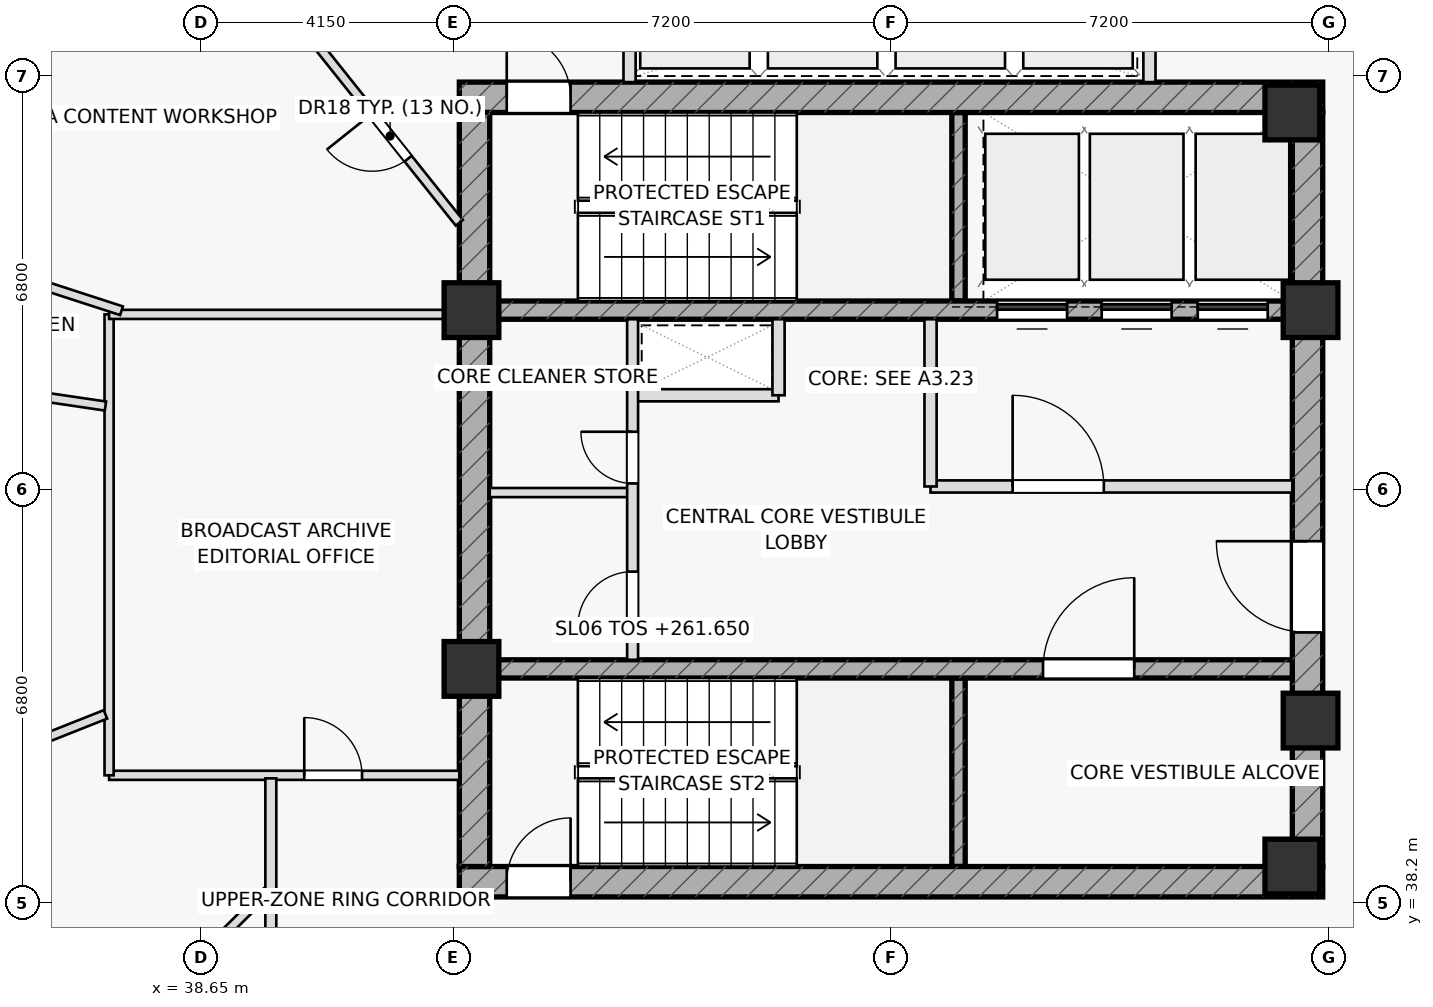
"""IFC4 building model, lengths in metres.
Left out: names, types, materials, properties, quantities, classifications, styles, units other than length and angle.
Written with IfcOpenShell. Run it as: python <this file> out.ifc"""

import sys

from ifc_helpers import new_model, si_unit, direction, frame, frame_2d, origin, origin_2d, place, context, subcontext, project, spatial, rectangle, extrude, element, fill, save


model = new_model("IFC4")
c1 = context("Model", 3, precision=1e-05, world=origin(), true_north=direction((0.0, 1.0)))
c2 = subcontext(c1, "Body", "Model", "MODEL_VIEW")
j1 = project(units=[si_unit("LENGTHUNIT", "METRE"), si_unit("PLANEANGLEUNIT", "RADIAN")], contexts=[c1])
p1 = place(None, origin())
s1 = spatial("IfcSite", under=j1, at=p1, CompositionType="ELEMENT")
p2 = place(p1, origin())
s2 = spatial("IfcBuilding", under=s1, at=p2, CompositionType="ELEMENT")
p3 = place(p2, frame((0.0, 0.0, 261.65)))
s3 = spatial("IfcBuildingStorey", under=s2, at=p3, CompositionType="ELEMENT", Elevation=261.65)
for number, where, z_axis, x_axis in (
    (1, (51.11, 48.1, 0.0), (0.0, 0.0, 1.0), (0.0, 1.0, 0.0)),
    (2, (51.11, 38.8, 0.0), (0.0, 0.0, 1.0), (0.0, 1.0, 0.0)),
):
    element("IfcWall", number, at=place(p3, frame(where, z_axis=z_axis, x_axis=x_axis)), inside=s3, PredefinedType="SHEAR", context=c2, shape_type="SweptSolid", body=[
        extrude(rectangle(XDim=3.1, YDim=0.22, at=frame_2d((1.55, 0.0))), origin(), (0.0, 0.0, 1.0), 3.65),
    ])
p4 = place(p3, frame((42.9, 51.45, 0.0), z_axis=(0.0, 0.0, 1.0), x_axis=(1.0, 0.0, 0.0)))
e3 = element("IfcWall", 3, at=p4, inside=s3, PredefinedType="SHEAR", context=c2, shape_type="SweptSolid", body=[
    extrude(rectangle(XDim=14.2, YDim=0.5, at=frame_2d((7.1, 0.0))), origin(), (0.0, 0.0, 1.0), 3.65),
])
p5 = place(p4, frame((0.78, 0.0, 0.0)))
e4 = element("IfcOpeningElement", 4, at=p5, cuts=e3, PredefinedType="OPENING", context=c2, shape_type="SweptSolid", body=[
    extrude(rectangle(XDim=1.05, YDim=2.2, at=frame_2d((0.525, 1.1))), frame((0.0, 0.26, 0.0), z_axis=(0.0, -1.0, 0.0), x_axis=(1.0, 0.0, 0.0)), (0.0, 0.0, 1.0), 0.52),
])
p6 = place(p3, frame((42.9, 38.55, 0.0), z_axis=(0.0, 0.0, 1.0), x_axis=(1.0, 0.0, 0.0)))
e5 = element("IfcWall", 5, at=p6, inside=s3, PredefinedType="SHEAR", context=c2, shape_type="SweptSolid", body=[
    extrude(rectangle(XDim=14.2, YDim=0.5, at=frame_2d((7.1, 0.0))), origin(), (0.0, 0.0, 1.0), 3.65),
])
p7 = place(p6, frame((0.78, 0.0, 0.0)))
e6 = element("IfcOpeningElement", 6, at=p7, cuts=e5, PredefinedType="OPENING", context=c2, shape_type="SweptSolid", body=[
    extrude(rectangle(XDim=1.05, YDim=2.2, at=frame_2d((0.525, 1.1))), frame((0.0, 0.26, 0.0), z_axis=(0.0, -1.0, 0.0), x_axis=(1.0, 0.0, 0.0)), (0.0, 0.0, 1.0), 0.52),
])
p8 = place(p3, frame((43.15, 38.8, 0.0), z_axis=(0.0, 0.0, 1.0), x_axis=(0.0, 1.0, 0.0)))
e7 = element("IfcWall", 7, at=p8, inside=s3, PredefinedType="SHEAR", context=c2, shape_type="SweptSolid", body=[
    extrude(rectangle(XDim=12.4, YDim=0.5, at=frame_2d((6.2, 0.0))), origin(), (0.0, 0.0, 1.0), 3.65),
])
p9 = place(p3, frame((56.85, 38.8, 0.0), z_axis=(0.0, 0.0, 1.0), x_axis=(0.0, 1.0, 0.0)))
e8 = element("IfcWall", 8, at=p9, inside=s3, PredefinedType="SHEAR", context=c2, shape_type="SweptSolid", body=[
    extrude(rectangle(XDim=12.4, YDim=0.5, at=frame_2d((6.2, 0.0))), origin(), (0.0, 0.0, 1.0), 3.65),
])
p10 = place(p9, frame((3.85, 0.0, 0.0)))
e9 = element("IfcOpeningElement", 9, at=p10, cuts=e8, PredefinedType="OPENING", context=c2, shape_type="SweptSolid", body=[
    extrude(rectangle(XDim=1.5, YDim=2.2, at=frame_2d((0.75, 1.1))), frame((0.0, 0.26, 0.0), z_axis=(0.0, -1.0, 0.0), x_axis=(1.0, 0.0, 0.0)), (0.0, 0.0, 1.0), 0.52),
])
p11 = place(p3, frame((43.4, 47.95, 0.0), z_axis=(0.0, 0.0, 1.0), x_axis=(1.0, 0.0, 0.0)))
e10 = element("IfcWall", 10, at=p11, inside=s3, PredefinedType="SHEAR", context=c2, shape_type="SweptSolid", body=[
    extrude(rectangle(XDim=13.2, YDim=0.3, at=frame_2d((6.6, 0.0))), origin(), (0.0, 0.0, 1.0), 3.65),
])
p12 = place(p11, frame((8.345, 0.0, 0.0)))
e11 = element("IfcOpeningElement", 11, at=p12, cuts=e10, PredefinedType="OPENING", context=c2, shape_type="SweptSolid", body=[
    extrude(rectangle(XDim=1.15, YDim=2.2, at=frame_2d((0.575, 1.1))), frame((0.0, 0.16, 0.0), z_axis=(0.0, -1.0, 0.0), x_axis=(1.0, 0.0, 0.0)), (0.0, 0.0, 1.0), 0.32),
])
p13 = place(p11, frame((10.065, 0.0, 0.0)))
e12 = element("IfcOpeningElement", 12, at=p13, cuts=e10, PredefinedType="OPENING", context=c2, shape_type="SweptSolid", body=[
    extrude(rectangle(XDim=1.15, YDim=2.2, at=frame_2d((0.575, 1.1))), frame((0.0, 0.16, 0.0), z_axis=(0.0, -1.0, 0.0), x_axis=(1.0, 0.0, 0.0)), (0.0, 0.0, 1.0), 0.32),
])
p14 = place(p11, frame((11.645, 0.0, 0.0)))
e13 = element("IfcOpeningElement", 13, at=p14, cuts=e10, PredefinedType="OPENING", context=c2, shape_type="SweptSolid", body=[
    extrude(rectangle(XDim=1.15, YDim=2.2, at=frame_2d((0.575, 1.1))), frame((0.0, 0.16, 0.0), z_axis=(0.0, -1.0, 0.0), x_axis=(1.0, 0.0, 0.0)), (0.0, 0.0, 1.0), 0.32),
])
p15 = place(p3, frame((43.4, 42.05, 0.0), z_axis=(0.0, 0.0, 1.0), x_axis=(1.0, 0.0, 0.0)))
e14 = element("IfcWall", 14, at=p15, inside=s3, PredefinedType="SHEAR", context=c2, shape_type="SweptSolid", body=[
    extrude(rectangle(XDim=13.2, YDim=0.3, at=frame_2d((6.6, 0.0))), origin(), (0.0, 0.0, 1.0), 3.65),
])
p16 = place(p15, frame((9.1, 0.0, 0.0)))
e15 = element("IfcOpeningElement", 15, at=p16, cuts=e14, PredefinedType="OPENING", context=c2, shape_type="SweptSolid", body=[
    extrude(rectangle(XDim=1.5, YDim=2.2, at=frame_2d((0.75, 1.1))), frame((0.0, 0.16, 0.0), z_axis=(0.0, -1.0, 0.0), x_axis=(1.0, 0.0, 0.0)), (0.0, 0.0, 1.0), 0.32),
])
for number, where, z_axis, x_axis in (
    (16, (43.1, 47.95, 0.0), (0.0, 0.0, 1.0), (1.0, 0.0, 0.0)),
    (17, (56.9, 47.95, 0.0), (0.0, 0.0, 1.0), (1.0, 0.0, 0.0)),
    (18, (56.6, 51.2, 0.0), (0.0, 0.0, 1.0), (1.0, 0.0, 0.0)),
    (19, (43.1, 42.05, 0.0), (0.0, 0.0, 1.0), (1.0, 0.0, 0.0)),
    (20, (56.9, 41.2, 0.0), (0.0, 0.0, 1.0), (1.0, 0.0, 0.0)),
    (21, (56.6, 38.8, 0.0), (0.0, 0.0, 1.0), (1.0, 0.0, 0.0)),
):
    element("IfcColumn", number, at=place(p3, frame(where, z_axis=z_axis, x_axis=x_axis)), inside=s3, PredefinedType="COLUMN", context=c2, shape_type="SweptSolid", body=[
        extrude(rectangle(XDim=0.9, YDim=0.9, at=origin_2d()), origin(), (0.0, 0.0, 1.0), 3.65),
    ])
for number, where, z_axis, x_axis in (
    (22, (45.7, 51.7, 0.0), (0.0, 0.0, 1.0), (0.0, 1.0, 0.0)),
    (23, (54.25, 51.7, 0.0), (0.0, 0.0, 1.0), (0.0, 1.0, 0.0)),
):
    element("IfcWall", number, at=place(p3, frame(where, z_axis=z_axis, x_axis=x_axis)), inside=s3, PredefinedType="PARTITIONING", context=c2, shape_type="SweptSolid", body=[
        extrude(rectangle(XDim=2.6, YDim=0.2, at=frame_2d((1.3, 0.0))), origin(), (0.0, 0.0, 1.0), 3.65),
    ])
p17 = place(p3, frame((45.75, 46.55, 0.0), z_axis=(0.0, 0.0, 1.0), x_axis=(1.0, 0.0, 0.0)))
e24 = element("IfcWall", 24, at=p17, inside=s3, PredefinedType="PARTITIONING", context=c2, shape_type="SweptSolid", body=[
    extrude(rectangle(XDim=2.4, YDim=0.2, at=frame_2d((1.2, 0.0))), origin(), (0.0, 0.0, 1.0), 3.65),
])
p18 = place(p3, frame((48.15, 46.55, 0.0), z_axis=(0.0, 0.0, 1.0), x_axis=(0.0, 1.0, 0.0)))
e25 = element("IfcWall", 25, at=p18, inside=s3, PredefinedType="PARTITIONING", context=c2, shape_type="SweptSolid", body=[
    extrude(rectangle(XDim=1.25, YDim=0.2, at=frame_2d((0.625, 0.0))), origin(), (0.0, 0.0, 1.0), 3.65),
])
p19 = place(p3, frame((50.65, 45.05, 0.0), z_axis=(0.0, 0.0, 1.0), x_axis=(1.0, 0.0, 0.0)))
e26 = element("IfcWall", 26, at=p19, inside=s3, PredefinedType="PARTITIONING", context=c2, shape_type="SweptSolid", body=[
    extrude(rectangle(XDim=5.95, YDim=0.2, at=frame_2d((2.975, 0.0))), origin(), (0.0, 0.0, 1.0), 3.65),
])
p20 = place(p19, frame((1.35, 0.0, 0.0)))
e27 = element("IfcOpeningElement", 27, at=p20, cuts=e26, PredefinedType="OPENING", context=c2, shape_type="SweptSolid", body=[
    extrude(rectangle(XDim=1.5, YDim=2.2, at=frame_2d((0.75, 1.1))), frame((0.0, 0.11, 0.0), z_axis=(0.0, -1.0, 0.0), x_axis=(1.0, 0.0, 0.0)), (0.0, 0.0, 1.0), 0.22),
])
p21 = place(p3, frame((50.65, 45.05, 0.0), z_axis=(0.0, 0.0, 1.0), x_axis=(0.0, 1.0, 0.0)))
e28 = element("IfcWall", 28, at=p21, inside=s3, PredefinedType="PARTITIONING", context=c2, shape_type="SweptSolid", body=[
    extrude(rectangle(XDim=2.75, YDim=0.2, at=frame_2d((1.375, 0.0))), origin(), (0.0, 0.0, 1.0), 3.65),
])
p22 = place(p3, frame((43.4, 44.95, 0.0), z_axis=(0.0, 0.0, 1.0), x_axis=(1.0, 0.0, 0.0)))
e29 = element("IfcWall", 29, at=p22, inside=s3, PredefinedType="PARTITIONING", context=c2, shape_type="SweptSolid", body=[
    extrude(rectangle(XDim=2.35, YDim=0.15, at=frame_2d((1.175, 0.0))), origin(), (0.0, 0.0, 1.0), 3.65),
])
p23 = place(p3, frame((45.75, 42.2, 0.0), z_axis=(0.0, 0.0, 1.0), x_axis=(0.0, 1.0, 0.0)))
e30 = element("IfcWall", 30, at=p23, inside=s3, PredefinedType="PARTITIONING", context=c2, shape_type="SweptSolid", body=[
    extrude(rectangle(XDim=5.6, YDim=0.18, at=frame_2d((2.8, 0.0))), origin(), (0.0, 0.0, 1.0), 3.65),
])
p24 = place(p23, frame((0.55, 0.0, 0.0)))
e31 = element("IfcOpeningElement", 31, at=p24, cuts=e30, PredefinedType="OPENING", context=c2, shape_type="SweptSolid", body=[
    extrude(rectangle(XDim=0.9, YDim=2.05, at=frame_2d((0.45, 1.025))), frame((0.0, 0.1, 0.0), z_axis=(0.0, -1.0, 0.0), x_axis=(1.0, 0.0, 0.0)), (0.0, 0.0, 1.0), 0.2),
])
p25 = place(p23, frame((2.9, 0.0, 0.0)))
e32 = element("IfcOpeningElement", 32, at=p25, cuts=e30, PredefinedType="OPENING", context=c2, shape_type="SweptSolid", body=[
    extrude(rectangle(XDim=0.85, YDim=2.05, at=frame_2d((0.425, 1.025))), frame((0.0, 0.1, 0.0), z_axis=(0.0, -1.0, 0.0), x_axis=(1.0, 0.0, 0.0)), (0.0, 0.0, 1.0), 0.2),
])
p26 = place(p3, frame((37.14, 40.3, 0.0), z_axis=(0.0, 0.0, 1.0), x_axis=(1.0, 0.0, 0.0)))
e33 = element("IfcWall", 33, at=p26, inside=s3, PredefinedType="PARTITIONING", context=c2, shape_type="SweptSolid", body=[
    extrude(rectangle(XDim=5.76, YDim=0.15, at=frame_2d((2.88, 0.0))), origin(), (0.0, 0.0, 1.0), 3.075),
])
p27 = place(p26, frame((3.21, 0.0, 0.0)))
e34 = element("IfcOpeningElement", 34, at=p27, cuts=e33, PredefinedType="OPENING", context=c2, shape_type="SweptSolid", body=[
    extrude(rectangle(XDim=0.95, YDim=2.05, at=frame_2d((0.475, 1.025))), frame((0.0, 0.085, 0.0), z_axis=(0.0, -1.0, 0.0), x_axis=(1.0, 0.0, 0.0)), (0.0, 0.0, 1.0), 0.17),
])
p28 = place(p3, frame((37.14, 40.3, 0.0), z_axis=(0.0, 0.0, 1.0), x_axis=(0.0, 1.0, 0.0)))
e35 = element("IfcWall", 35, at=p28, inside=s3, PredefinedType="PARTITIONING", context=c2, shape_type="SweptSolid", body=[
    extrude(rectangle(XDim=7.58, YDim=0.15, at=frame_2d((3.79, 0.0))), origin(), (0.0, 0.0, 1.0), 3.65),
])
p29 = place(p3, frame((37.14, 47.88, 0.0), z_axis=(0.0, 0.0, 1.0), x_axis=(1.0, 0.0, 0.0)))
e36 = element("IfcWall", 36, at=p29, inside=s3, PredefinedType="PARTITIONING", context=c2, shape_type="SweptSolid", body=[
    extrude(rectangle(XDim=5.76, YDim=0.15, at=frame_2d((2.88, 0.0))), origin(), (0.0, 0.0, 1.0), 3.075),
])
p30 = place(p3, frame((42.9, 49.386, 0.0), z_axis=(0.0, 0.0, 1.0), x_axis=(-0.623702774592, 0.781661594916, 0.0)))
e37 = element("IfcWall", 37, at=p30, inside=s3, PredefinedType="PARTITIONING", context=c2, shape_type="SweptSolid", body=[
    extrude(rectangle(XDim=18.162, YDim=0.15, at=frame_2d((9.081, 0.0))), origin(), (0.0, 0.0, 1.0), 3.075),
])
p31 = place(p30, frame((1.35, 0.0, 0.0)))
e38 = element("IfcOpeningElement", 38, at=p31, cuts=e37, PredefinedType="OPENING", context=c2, shape_type="SweptSolid", body=[
    extrude(rectangle(XDim=0.95, YDim=2.05, at=frame_2d((0.475, 1.025))), frame((0.0, 0.085, 0.0), z_axis=(0.0, -1.0, 0.0), x_axis=(1.0, 0.0, 0.0)), (0.0, 0.0, 1.0), 0.17),
])
p32 = place(p3, frame((37.344, 47.94, 0.0), z_axis=(0.0, 0.0, 1.0), x_axis=(-0.951130517785, 0.308789148348, 0.0)))
e39 = element("IfcWall", 39, at=p32, inside=s3, PredefinedType="PARTITIONING", context=c2, shape_type="SweptSolid", body=[
    extrude(rectangle(XDim=13.034, YDim=0.15, at=frame_2d((6.517, 0.0))), origin(), (0.0, 0.0, 1.0), 3.175),
])
p33 = place(p3, frame((37.08, 46.373, 0.0), z_axis=(0.0, 0.0, 1.0), x_axis=(-0.989321908316, 0.145746909836, 0.0)))
e40 = element("IfcWall", 40, at=p33, inside=s3, PredefinedType="PARTITIONING", context=c2, shape_type="SweptSolid", body=[
    extrude(rectangle(XDim=12.394, YDim=0.15, at=frame_2d((6.197, 0.0))), origin(), (0.0, 0.0, 1.0), 3.075),
])
p34 = place(p33, frame((3.15, 0.0, 0.0)))
e41 = element("IfcOpeningElement", 41, at=p34, cuts=e40, PredefinedType="OPENING", context=c2, shape_type="SweptSolid", body=[
    extrude(rectangle(XDim=0.95, YDim=2.05, at=frame_2d((0.475, 1.025))), frame((0.0, 0.085, 0.0), z_axis=(0.0, -1.0, 0.0), x_axis=(1.0, 0.0, 0.0)), (0.0, 0.0, 1.0), 0.17),
])
p35 = place(p3, frame((37.08, 41.302, 0.0), z_axis=(0.0, 0.0, 1.0), x_axis=(-0.929496393642, -0.368831200154, 0.0)))
e42 = element("IfcWall", 42, at=p35, inside=s3, PredefinedType="PARTITIONING", context=c2, shape_type="SweptSolid", body=[
    extrude(rectangle(XDim=11.222, YDim=0.15, at=frame_2d((5.611, 0.0))), origin(), (0.0, 0.0, 1.0), 3.075),
])
p36 = place(p35, frame((2.55, 0.0, 0.0)))
e43 = element("IfcOpeningElement", 43, at=p36, cuts=e42, PredefinedType="OPENING", context=c2, shape_type="SweptSolid", body=[
    extrude(rectangle(XDim=0.95, YDim=2.05, at=frame_2d((0.475, 1.025))), frame((0.0, 0.085, 0.0), z_axis=(0.0, -1.0, 0.0), x_axis=(1.0, 0.0, 0.0)), (0.0, 0.0, 1.0), 0.17),
])
p37 = place(p3, frame((39.8, 38.45, 0.0), z_axis=(0.0, 0.0, 1.0), x_axis=(-0.709807958625, -0.704395245493, 0.0)))
e44 = element("IfcWall", 44, at=p37, inside=s3, PredefinedType="PARTITIONING", context=c2, shape_type="SweptSolid", body=[
    extrude(rectangle(XDim=12.494, YDim=0.15, at=frame_2d((6.247, 0.0))), origin(), (0.0, 0.0, 1.0), 3.075),
])
p38 = place(p37, frame((1.35, 0.0, 0.0)))
e45 = element("IfcOpeningElement", 45, at=p38, cuts=e44, PredefinedType="OPENING", context=c2, shape_type="SweptSolid", body=[
    extrude(rectangle(XDim=0.95, YDim=2.05, at=frame_2d((0.475, 1.025))), frame((0.0, 0.085, 0.0), z_axis=(0.0, -1.0, 0.0), x_axis=(1.0, 0.0, 0.0)), (0.0, 0.0, 1.0), 0.17),
])
p39 = place(p3, frame((39.8, 36.17, 0.0), z_axis=(0.0, 0.0, 1.0), x_axis=(0.0, 1.0, 0.0)))
e46 = element("IfcWall", 46, at=p39, inside=s3, PredefinedType="PARTITIONING", context=c2, shape_type="SweptSolid", body=[
    extrude(rectangle(XDim=4.08, YDim=0.18, at=frame_2d((2.04, 0.0))), origin(), (0.0, 0.0, 1.0), 3.355),
])
p40 = place(p5, origin())
e47 = element("IfcDoor", 47, at=p40, inside=s3, OperationType="SINGLE_SWING_LEFT", PredefinedType="DOOR", context=c2, shape_type="SweptSolid", body=[
    extrude(rectangle(XDim=1.05, YDim=2.2, at=frame_2d((0.525, 1.1))), frame((0.0, 0.025, 0.0), z_axis=(0.0, -1.0, 0.0), x_axis=(1.0, 0.0, 0.0)), (0.0, 0.0, 1.0), 0.05),
])
fill(e4, e47)
p41 = place(p7, origin())
e48 = element("IfcDoor", 48, at=p41, inside=s3, OperationType="SINGLE_SWING_RIGHT", PredefinedType="DOOR", context=c2, shape_type="SweptSolid", body=[
    extrude(rectangle(XDim=1.05, YDim=2.2, at=frame_2d((0.525, 1.1))), frame((0.0, 0.025, 0.0), z_axis=(0.0, -1.0, 0.0), x_axis=(1.0, 0.0, 0.0)), (0.0, 0.0, 1.0), 0.05),
])
fill(e6, e48)
p42 = place(p10, origin())
e49 = element("IfcDoor", 49, at=p42, inside=s3, OperationType="SINGLE_SWING_RIGHT", PredefinedType="DOOR", context=c2, shape_type="SweptSolid", body=[
    extrude(rectangle(XDim=1.5, YDim=2.2, at=frame_2d((0.75, 1.1))), frame((0.0, 0.025, 0.0), z_axis=(0.0, -1.0, 0.0), x_axis=(1.0, 0.0, 0.0)), (0.0, 0.0, 1.0), 0.05),
])
fill(e9, e49)
p43 = place(p20, origin())
e50 = element("IfcDoor", 50, at=p43, inside=s3, OperationType="SINGLE_SWING_LEFT", PredefinedType="DOOR", context=c2, shape_type="SweptSolid", body=[
    extrude(rectangle(XDim=1.5, YDim=2.2, at=frame_2d((0.75, 1.1))), frame((0.0, 0.025, 0.0), z_axis=(0.0, -1.0, 0.0), x_axis=(1.0, 0.0, 0.0)), (0.0, 0.0, 1.0), 0.05),
])
fill(e27, e50)
p44 = place(p16, origin())
e51 = element("IfcDoor", 51, at=p44, inside=s3, OperationType="SINGLE_SWING_RIGHT", PredefinedType="DOOR", context=c2, shape_type="SweptSolid", body=[
    extrude(rectangle(XDim=1.5, YDim=2.2, at=frame_2d((0.75, 1.1))), frame((0.0, 0.025, 0.0), z_axis=(0.0, -1.0, 0.0), x_axis=(1.0, 0.0, 0.0)), (0.0, 0.0, 1.0), 0.05),
])
fill(e15, e51)
p45 = place(p24, origin())
e52 = element("IfcDoor", 52, at=p45, inside=s3, OperationType="SINGLE_SWING_LEFT", PredefinedType="DOOR", context=c2, shape_type="SweptSolid", body=[
    extrude(rectangle(XDim=0.9, YDim=2.05, at=frame_2d((0.45, 1.025))), frame((0.0, 0.025, 0.0), z_axis=(0.0, -1.0, 0.0), x_axis=(1.0, 0.0, 0.0)), (0.0, 0.0, 1.0), 0.05),
])
fill(e31, e52)
p46 = place(p25, origin())
e53 = element("IfcDoor", 53, at=p46, inside=s3, OperationType="SINGLE_SWING_RIGHT", PredefinedType="DOOR", context=c2, shape_type="SweptSolid", body=[
    extrude(rectangle(XDim=0.85, YDim=2.05, at=frame_2d((0.425, 1.025))), frame((0.0, 0.025, 0.0), z_axis=(0.0, -1.0, 0.0), x_axis=(1.0, 0.0, 0.0)), (0.0, 0.0, 1.0), 0.05),
])
fill(e32, e53)
p47 = place(p27, origin())
e54 = element("IfcDoor", 54, at=p47, inside=s3, OperationType="SINGLE_SWING_LEFT", PredefinedType="DOOR", context=c2, shape_type="SweptSolid", body=[
    extrude(rectangle(XDim=0.95, YDim=2.05, at=frame_2d((0.475, 1.025))), frame((0.0, 0.025, 0.0), z_axis=(0.0, -1.0, 0.0), x_axis=(1.0, 0.0, 0.0)), (0.0, 0.0, 1.0), 0.05),
])
fill(e34, e54)
p48 = place(p31, origin())
e55 = element("IfcDoor", 55, at=p48, inside=s3, OperationType="SINGLE_SWING_RIGHT", PredefinedType="DOOR", context=c2, shape_type="SweptSolid", body=[
    extrude(rectangle(XDim=0.95, YDim=2.05, at=frame_2d((0.475, 1.025))), frame((0.0, 0.025, 0.0), z_axis=(0.0, -1.0, 0.0), x_axis=(1.0, 0.0, 0.0)), (0.0, 0.0, 1.0), 0.05),
])
fill(e38, e55)
p49 = place(p12, origin())
e56 = element("IfcDoor", 56, at=p49, inside=s3, OperationType="SLIDING_TO_LEFT", PredefinedType="DOOR", context=c2, shape_type="SweptSolid", body=[
    extrude(rectangle(XDim=1.15, YDim=2.2, at=frame_2d((0.575, 1.1))), frame((0.0, 0.025, 0.0), z_axis=(0.0, -1.0, 0.0), x_axis=(1.0, 0.0, 0.0)), (0.0, 0.0, 1.0), 0.05),
])
fill(e11, e56)
p50 = place(p13, origin())
e57 = element("IfcDoor", 57, at=p50, inside=s3, OperationType="SLIDING_TO_LEFT", PredefinedType="DOOR", context=c2, shape_type="SweptSolid", body=[
    extrude(rectangle(XDim=1.15, YDim=2.2, at=frame_2d((0.575, 1.1))), frame((0.0, 0.025, 0.0), z_axis=(0.0, -1.0, 0.0), x_axis=(1.0, 0.0, 0.0)), (0.0, 0.0, 1.0), 0.05),
])
fill(e12, e57)
p51 = place(p14, origin())
e58 = element("IfcDoor", 58, at=p51, inside=s3, OperationType="SLIDING_TO_LEFT", PredefinedType="DOOR", context=c2, shape_type="SweptSolid", body=[
    extrude(rectangle(XDim=1.15, YDim=2.2, at=frame_2d((0.575, 1.1))), frame((0.0, 0.025, 0.0), z_axis=(0.0, -1.0, 0.0), x_axis=(1.0, 0.0, 0.0)), (0.0, 0.0, 1.0), 0.05),
])
fill(e13, e58)
save(model, sys.argv[1])
